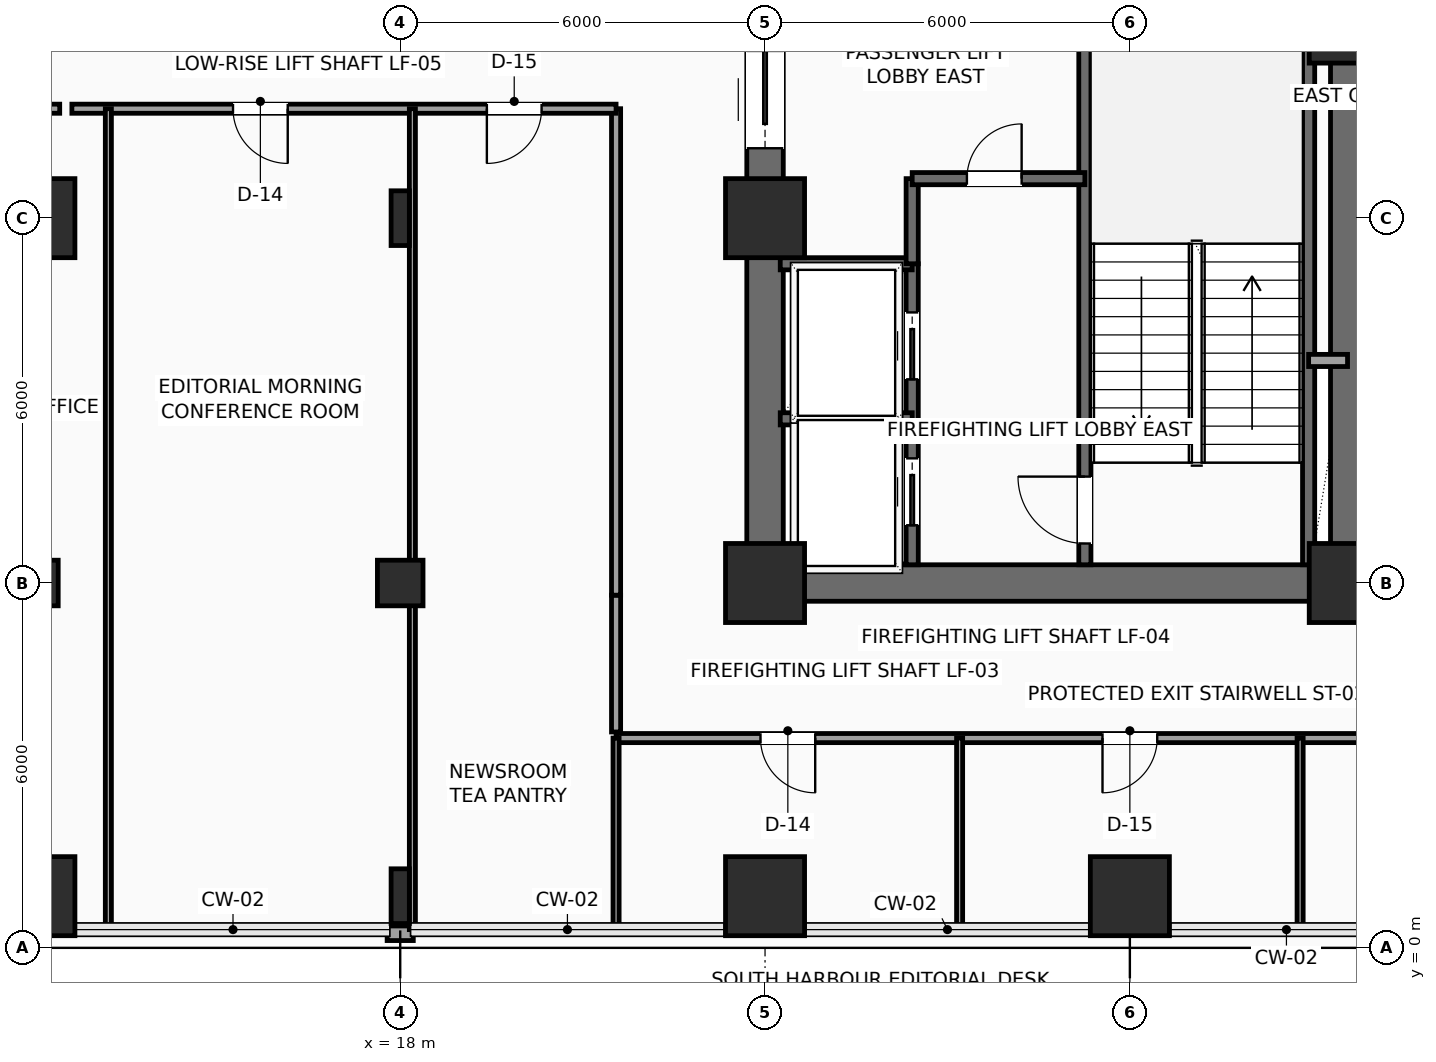
"""IFC4 building model, lengths in metres.
Left out: names, types, materials, properties, quantities, classifications, styles, units other than length and angle.
Written with IfcOpenShell. Run it as: python <this file> out.ifc"""

import sys

from ifc_helpers import new_model, si_unit, direction, frame, frame_2d, origin, origin_2d, place, context, subcontext, project, spatial, rectangle, hollow_rectangle, i_section, extrude, element, fill, save


model = new_model("IFC4")
c1 = context("Model", 3, precision=1e-05, world=origin(), true_north=direction((0.0, 1.0)))
c2 = subcontext(c1, "Body", "Model", "MODEL_VIEW")
j1 = project(units=[si_unit("LENGTHUNIT", "METRE"), si_unit("PLANEANGLEUNIT", "RADIAN")], contexts=[c1])
p1 = place(None, origin())
s1 = spatial("IfcSite", under=j1, at=p1, CompositionType="ELEMENT")
p2 = place(p1, origin())
s2 = spatial("IfcBuilding", under=s1, at=p2, CompositionType="ELEMENT")
p3 = place(p2, frame((0.0, 0.0, 40.2)))
s3 = spatial("IfcBuildingStorey", under=s2, at=p3, CompositionType="ELEMENT", Elevation=40.2)
for number, where, z_axis, x_axis in (
    (1, (24.0, 6.0, 0.0), (0.0, 0.0, 1.0), (1.0, 0.0, 0.0)),
    (2, (24.0, 12.0, 0.0), (0.0, 0.0, 1.0), (1.0, 0.0, 0.0)),
    (3, (33.6, 6.0, 0.0), (0.0, 0.0, 1.0), (1.0, 0.0, 0.0)),
    (4, (33.6, 15.2, 0.0), (0.0, 0.0, 1.0), (1.0, 0.0, 0.0)),
    (5, (12.0, 0.85, 0.0), (0.0, 0.0, 1.0), (1.0, 0.0, 0.0)),
):
    element("IfcColumn", number, at=place(p3, frame(where, z_axis=z_axis, x_axis=x_axis)), inside=s3, PredefinedType="COLUMN", context=c2, shape_type="SweptSolid", body=[
        extrude(rectangle(XDim=1.3, YDim=1.3, at=origin_2d()), origin(), (0.0, 0.0, 1.0), 3.9),
    ])
p4 = place(p3, frame((12.0, 6.0, 0.0), z_axis=(0.0, 0.0, 1.0), x_axis=(1.0, 0.0, 0.0)))
e6 = element("IfcColumn", 6, at=p4, inside=s3, PredefinedType="COLUMN", context=c2, shape_type="SweptSolid", body=[
    extrude(hollow_rectangle(XDim=0.75, YDim=0.75, WallThickness=0.035, InnerFilletRadius=0.035, OuterFilletRadius=0.05, at=origin_2d()), origin(), (0.0, 0.0, 1.0), 3.9),
])
p5 = place(p3, frame((12.0, 12.0, 0.0), z_axis=(0.0, 0.0, 1.0), x_axis=(1.0, 0.0, 0.0)))
e7 = element("IfcColumn", 7, at=p5, inside=s3, PredefinedType="COLUMN", context=c2, shape_type="SweptSolid", body=[
    extrude(rectangle(XDim=1.3, YDim=1.3, at=origin_2d()), origin(), (0.0, 0.0, 1.0), 3.9),
])
p6 = place(p3, frame((18.0, 0.85, 0.0), z_axis=(0.0, 0.0, 1.0), x_axis=(1.0, 0.0, 0.0)))
e8 = element("IfcColumn", 8, at=p6, inside=s3, PredefinedType="COLUMN", context=c2, shape_type="SweptSolid", body=[
    extrude(i_section(OverallWidth=0.3, OverallDepth=0.9, WebThickness=0.019, FlangeThickness=0.035, FilletRadius=0.03, at=origin_2d()), origin(), (0.0, 0.0, 1.0), 3.9),
])
p7 = place(p3, frame((18.0, 6.0, 0.0), z_axis=(0.0, 0.0, 1.0), x_axis=(1.0, 0.0, 0.0)))
e9 = element("IfcColumn", 9, at=p7, inside=s3, PredefinedType="COLUMN", context=c2, shape_type="SweptSolid", body=[
    extrude(hollow_rectangle(XDim=0.75, YDim=0.75, WallThickness=0.035, InnerFilletRadius=0.035, OuterFilletRadius=0.05, at=origin_2d()), origin(), (0.0, 0.0, 1.0), 3.9),
])
p8 = place(p3, frame((18.0, 12.0, 0.0), z_axis=(0.0, 0.0, 1.0), x_axis=(1.0, 0.0, 0.0)))
e10 = element("IfcColumn", 10, at=p8, inside=s3, PredefinedType="COLUMN", context=c2, shape_type="SweptSolid", body=[
    extrude(i_section(OverallWidth=0.3, OverallDepth=0.9, WebThickness=0.019, FlangeThickness=0.035, FilletRadius=0.03, at=origin_2d()), origin(), (0.0, 0.0, 1.0), 3.9),
])
for number, where, z_axis, x_axis in (
    (11, (24.0, 0.85, 0.0), (0.0, 0.0, 1.0), (1.0, 0.0, 0.0)),
    (12, (30.0, 0.85, 0.0), (0.0, 0.0, 1.0), (1.0, 0.0, 0.0)),
):
    element("IfcColumn", number, at=place(p3, frame(where, z_axis=z_axis, x_axis=x_axis)), inside=s3, PredefinedType="COLUMN", context=c2, shape_type="SweptSolid", body=[
        extrude(rectangle(XDim=1.3, YDim=1.3, at=origin_2d()), origin(), (0.0, 0.0, 1.0), 3.9),
    ])
p9 = place(p3, frame((18.215, 0.24, 0.0), z_axis=(0.0, 0.0, 1.0), x_axis=(-1.0, 0.0, 0.0)))
e13 = element("IfcWall", 13, at=p9, inside=s3, PredefinedType="SOLIDWALL", context=c2, shape_type="SweptSolid", body=[
    extrude(rectangle(XDim=0.43, YDim=0.24, at=frame_2d((0.215, 0.0))), origin(), (0.0, 0.0, 1.0), 3.65),
])
p10 = place(p3, frame((24.0, 6.0, 0.0), z_axis=(0.0, 0.0, 1.0), x_axis=(1.0, 0.0, 0.0)))
e14 = element("IfcWall", 14, at=p10, inside=s3, PredefinedType="SHEAR", context=c2, shape_type="SweptSolid", body=[
    extrude(rectangle(XDim=9.6, YDim=0.6, at=frame_2d((4.8, 0.0))), origin(), (0.0, 0.0, 1.0), 3.65),
])
p11 = place(p3, frame((24.0, 6.0, 0.0), z_axis=(0.0, 0.0, 1.0), x_axis=(0.0, 1.0, 0.0)))
e15 = element("IfcWall", 15, at=p11, inside=s3, PredefinedType="SHEAR", context=c2, shape_type="SweptSolid", body=[
    extrude(rectangle(XDim=12.0, YDim=0.6, at=frame_2d((6.0, 0.0))), origin(), (0.0, 0.0, 1.0), 3.65),
])
p12 = place(p11, frame((7.15, 0.0, 0.0)))
e16 = element("IfcOpeningElement", 16, at=p12, cuts=e15, PredefinedType="OPENING", context=c2, shape_type="SweptSolid", body=[
    extrude(rectangle(XDim=1.6, YDim=2.3, at=frame_2d((0.8, 1.15))), frame((0.0, 0.31, 0.0), z_axis=(0.0, -1.0, 0.0), x_axis=(1.0, 0.0, 0.0)), (0.0, 0.0, 1.0), 0.62),
])
p13 = place(p3, frame((33.6, 6.0, 0.0), z_axis=(0.0, 0.0, 1.0), x_axis=(0.0, 1.0, 0.0)))
e17 = element("IfcWall", 17, at=p13, inside=s3, PredefinedType="SHEAR", context=c2, shape_type="SweptSolid", body=[
    extrude(rectangle(XDim=12.0, YDim=0.6, at=frame_2d((6.0, 0.0))), origin(), (0.0, 0.0, 1.0), 3.65),
])
p14 = place(p13, frame((10.2, 0.0, 0.0)))
e18 = element("IfcOpeningElement", 18, at=p14, cuts=e17, PredefinedType="OPENING", context=c2, shape_type="SweptSolid", body=[
    extrude(rectangle(XDim=0.9, YDim=2.15, at=frame_2d((0.45, 1.075))), frame((0.0, 0.31, 0.0), z_axis=(0.0, -1.0, 0.0), x_axis=(1.0, 0.0, 0.0)), (0.0, 0.0, 1.0), 0.62),
])
p15 = place(p3, frame((29.26, 6.3, 0.0), z_axis=(0.0, 0.0, 1.0), x_axis=(0.0, 1.0, 0.0)))
e19 = element("IfcWall", 19, at=p15, inside=s3, PredefinedType="SHEAR", context=c2, shape_type="SweptSolid", body=[
    extrude(rectangle(XDim=8.88, YDim=0.2, at=frame_2d((4.44, 0.0))), origin(), (0.0, 0.0, 1.0), 3.65),
])
p16 = place(p15, frame((0.35, 0.0, 0.0)))
e20 = element("IfcOpeningElement", 20, at=p16, cuts=e19, PredefinedType="OPENING", context=c2, shape_type="SweptSolid", body=[
    extrude(rectangle(XDim=1.1, YDim=2.2, at=frame_2d((0.55, 1.1))), frame((0.0, 0.11, 0.0), z_axis=(0.0, -1.0, 0.0), x_axis=(1.0, 0.0, 0.0)), (0.0, 0.0, 1.0), 0.22),
])
p17 = place(p3, frame((32.94, 6.3, 0.0), z_axis=(0.0, 0.0, 1.0), x_axis=(0.0, 1.0, 0.0)))
e21 = element("IfcWall", 21, at=p17, inside=s3, PredefinedType="SHEAR", context=c2, shape_type="SweptSolid", body=[
    extrude(rectangle(XDim=8.88, YDim=0.2, at=frame_2d((4.44, 0.0))), origin(), (0.0, 0.0, 1.0), 3.65),
])
p18 = place(p3, frame((26.42, 6.3, 0.0), z_axis=(0.0, 0.0, 1.0), x_axis=(0.0, 1.0, 0.0)))
e22 = element("IfcWall", 22, at=p18, inside=s3, PredefinedType="SHEAR", context=c2, shape_type="SweptSolid", body=[
    extrude(rectangle(XDim=4.95, YDim=0.2, at=frame_2d((2.475, 0.0))), origin(), (0.0, 0.0, 1.0), 3.65),
])
p19 = place(p18, frame((0.65, 0.0, 0.0)))
e23 = element("IfcOpeningElement", 23, at=p19, cuts=e22, PredefinedType="OPENING", context=c2, shape_type="SweptSolid", body=[
    extrude(rectangle(XDim=1.1, YDim=2.2, at=frame_2d((0.55, 1.1))), frame((0.0, 0.11, 0.0), z_axis=(0.0, -1.0, 0.0), x_axis=(1.0, 0.0, 0.0)), (0.0, 0.0, 1.0), 0.22),
])
p20 = place(p18, frame((3.05, 0.0, 0.0)))
e24 = element("IfcOpeningElement", 24, at=p20, cuts=e22, PredefinedType="OPENING", context=c2, shape_type="SweptSolid", body=[
    extrude(rectangle(XDim=1.1, YDim=2.2, at=frame_2d((0.55, 1.1))), frame((0.0, 0.11, 0.0), z_axis=(0.0, -1.0, 0.0), x_axis=(1.0, 0.0, 0.0)), (0.0, 0.0, 1.0), 0.22),
])
for number, where, z_axis, x_axis in (
    (25, (24.25, 8.7, 0.0), (0.0, 0.0, 1.0), (1.0, 0.0, 0.0)),
    (26, (24.25, 11.25, 0.0), (0.0, 0.0, 1.0), (1.0, 0.0, 0.0)),
):
    element("IfcWall", number, at=place(p3, frame(where, z_axis=z_axis, x_axis=x_axis)), inside=s3, PredefinedType="SHEAR", context=c2, shape_type="SweptSolid", body=[
        extrude(rectangle(XDim=2.17, YDim=0.2, at=frame_2d((1.085, 0.0))), origin(), (0.0, 0.0, 1.0), 3.65),
    ])
p21 = place(p3, frame((26.42, 11.25, 0.0), z_axis=(0.0, 0.0, 1.0), x_axis=(0.0, 1.0, 0.0)))
e27 = element("IfcWall", 27, at=p21, inside=s3, PredefinedType="SHEAR", context=c2, shape_type="SweptSolid", body=[
    extrude(rectangle(XDim=1.4, YDim=0.2, at=frame_2d((0.7, 0.0))), origin(), (0.0, 0.0, 1.0), 3.65),
])
p22 = place(p3, frame((26.42, 12.65, 0.0), z_axis=(0.0, 0.0, 1.0), x_axis=(1.0, 0.0, 0.0)))
e28 = element("IfcWall", 28, at=p22, inside=s3, PredefinedType="SHEAR", context=c2, shape_type="SweptSolid", body=[
    extrude(rectangle(XDim=2.84, YDim=0.2, at=frame_2d((1.42, 0.0))), origin(), (0.0, 0.0, 1.0), 3.65),
])
p23 = place(p22, frame((0.9, 0.0, 0.0)))
e29 = element("IfcOpeningElement", 29, at=p23, cuts=e28, PredefinedType="OPENING", context=c2, shape_type="SweptSolid", body=[
    extrude(rectangle(XDim=0.9, YDim=2.15, at=frame_2d((0.45, 1.075))), frame((0.0, 0.11, 0.0), z_axis=(0.0, -1.0, 0.0), x_axis=(1.0, 0.0, 0.0)), (0.0, 0.0, 1.0), 0.22),
])
p24 = place(p3, frame((32.94, 9.66, 0.0), z_axis=(0.0, 0.0, 1.0), x_axis=(1.0, 0.0, 0.0)))
e30 = element("IfcWall", 30, at=p24, inside=s3, PredefinedType="SOLIDWALL", context=c2, shape_type="SweptSolid", body=[
    extrude(rectangle(XDim=0.64, YDim=0.2, at=frame_2d((0.32, 0.0))), origin(), (0.0, 0.0, 1.0), 3.65),
])
p25 = place(p3, frame((36.15, 3.45, 0.0), z_axis=(0.0, 0.0, 1.0), x_axis=(-1.0, 0.0, 0.0)))
e31 = element("IfcWall", 31, at=p25, inside=s3, PredefinedType="PARTITIONING", context=c2, shape_type="SweptSolid", body=[
    extrude(rectangle(XDim=14.6, YDim=0.15, at=frame_2d((7.3, 0.0))), origin(), (0.0, 0.0, 1.0), 3.142),
])
p26 = place(p25, frame((11.325, 0.0, 0.0)))
e32 = element("IfcOpeningElement", 32, at=p26, cuts=e31, PredefinedType="OPENING", context=c2, shape_type="SweptSolid", body=[
    extrude(rectangle(XDim=0.9, YDim=2.1, at=frame_2d((0.45, 1.05))), frame((0.0, 0.085, 0.0), z_axis=(0.0, -1.0, 0.0), x_axis=(1.0, 0.0, 0.0)), (0.0, 0.0, 1.0), 0.17),
])
p27 = place(p25, frame((5.7, 0.0, 0.0)))
e33 = element("IfcOpeningElement", 33, at=p27, cuts=e31, PredefinedType="OPENING", context=c2, shape_type="SweptSolid", body=[
    extrude(rectangle(XDim=0.9, YDim=2.1, at=frame_2d((0.45, 1.05))), frame((0.0, 0.085, 0.0), z_axis=(0.0, -1.0, 0.0), x_axis=(1.0, 0.0, 0.0)), (0.0, 0.0, 1.0), 0.17),
])
p28 = place(p3, frame((21.55, 3.55, 0.0), z_axis=(0.0, 0.0, 1.0), x_axis=(0.0, 1.0, 0.0)))
e34 = element("IfcWall", 34, at=p28, inside=s3, PredefinedType="PARTITIONING", context=c2, shape_type="SweptSolid", body=[
    extrude(rectangle(XDim=2.25, YDim=0.15, at=frame_2d((1.125, 0.0))), origin(), (0.0, 0.0, 1.0), 3.65),
])
p29 = place(p3, frame((21.55, 5.8, 0.0), z_axis=(0.0, 0.0, 1.0), x_axis=(0.0, 1.0, 0.0)))
e35 = element("IfcWall", 35, at=p29, inside=s3, PredefinedType="PARTITIONING", context=c2, shape_type="SweptSolid", body=[
    extrude(rectangle(XDim=8.0, YDim=0.15, at=frame_2d((4.0, 0.0))), origin(), (0.0, 0.0, 1.0), 3.65),
])
p30 = place(p3, frame((21.55, 13.8, 0.0), z_axis=(0.0, 0.0, 1.0), x_axis=(-1.0, 0.0, 0.0)))
e36 = element("IfcWall", 36, at=p30, inside=s3, PredefinedType="PARTITIONING", context=c2, shape_type="SweptSolid", body=[
    extrude(rectangle(XDim=8.95, YDim=0.15, at=frame_2d((4.475, 0.0))), origin(), (0.0, 0.0, 1.0), 3.65),
])
p31 = place(p30, frame((5.4, 0.0, 0.0)))
e37 = element("IfcOpeningElement", 37, at=p31, cuts=e36, PredefinedType="OPENING", context=c2, shape_type="SweptSolid", body=[
    extrude(rectangle(XDim=0.9, YDim=2.1, at=frame_2d((0.45, 1.05))), frame((0.0, 0.085, 0.0), z_axis=(0.0, -1.0, 0.0), x_axis=(1.0, 0.0, 0.0)), (0.0, 0.0, 1.0), 0.17),
])
p32 = place(p30, frame((1.225, 0.0, 0.0)))
e38 = element("IfcOpeningElement", 38, at=p32, cuts=e36, PredefinedType="OPENING", context=c2, shape_type="SweptSolid", body=[
    extrude(rectangle(XDim=0.9, YDim=2.1, at=frame_2d((0.45, 1.05))), frame((0.0, 0.085, 0.0), z_axis=(0.0, -1.0, 0.0), x_axis=(1.0, 0.0, 0.0)), (0.0, 0.0, 1.0), 0.17),
])
p33 = place(p3, frame((12.4, 13.8, 0.0), z_axis=(0.0, 0.0, 1.0), x_axis=(-1.0, 0.0, 0.0)))
e39 = element("IfcWall", 39, at=p33, inside=s3, PredefinedType="PARTITIONING", context=c2, shape_type="SweptSolid", body=[
    extrude(rectangle(XDim=7.15, YDim=0.15, at=frame_2d((3.575, 0.0))), origin(), (0.0, 0.0, 1.0), 3.65),
])
p34 = place(p33, frame((3.125, 0.0, 0.0)))
e40 = element("IfcOpeningElement", 40, at=p34, cuts=e39, PredefinedType="OPENING", context=c2, shape_type="SweptSolid", body=[
    extrude(rectangle(XDim=0.9, YDim=2.1, at=frame_2d((0.45, 1.05))), frame((0.0, 0.085, 0.0), z_axis=(0.0, -1.0, 0.0), x_axis=(1.0, 0.0, 0.0)), (0.0, 0.0, 1.0), 0.17),
])
p35 = place(p3, frame((6.215, 0.327, 0.0), z_axis=(0.0, 0.0, 1.0), x_axis=(0.999992473807, -0.003879733121, 0.0)))
e41 = element("IfcWall", 41, at=p35, inside=s3, PredefinedType="PARTITIONING", context=c2, shape_type="SweptSolid", body=[
    extrude(rectangle(XDim=6.985, YDim=0.1, at=frame_2d((3.492, 0.0))), origin(), (0.0, 0.0, 1.0), 3.65),
])
p36 = place(p3, frame((13.2, 0.3, 0.0), z_axis=(0.0, 0.0, 1.0), x_axis=(0.0, 1.0, 0.0)))
e42 = element("IfcWall", 42, at=p36, inside=s3, PredefinedType="PARTITIONING", context=c2, shape_type="SweptSolid", body=[
    extrude(rectangle(XDim=13.5, YDim=0.1, at=frame_2d((6.75, 0.0))), origin(), (0.0, 0.0, 1.0), 3.65),
])
p37 = place(p3, frame((18.2, 0.3, 0.0), z_axis=(0.0, 0.0, 1.0), x_axis=(0.0, 1.0, 0.0)))
e43 = element("IfcWall", 43, at=p37, inside=s3, PredefinedType="PARTITIONING", context=c2, shape_type="SweptSolid", body=[
    extrude(rectangle(XDim=13.5, YDim=0.1, at=frame_2d((6.75, 0.0))), origin(), (0.0, 0.0, 1.0), 2.992),
])
for number, where, z_axis, x_axis in (
    (44, (21.55, 0.3, 0.0), (0.0, 0.0, 1.0), (0.0, 1.0, 0.0)),
    (45, (27.2, 0.3, 0.0), (0.0, 0.0, 1.0), (0.0, 1.0, 0.0)),
    (46, (32.8, 0.3, 0.0), (0.0, 0.0, 1.0), (0.0, 1.0, 0.0)),
):
    element("IfcWall", number, at=place(p3, frame(where, z_axis=z_axis, x_axis=x_axis)), inside=s3, PredefinedType="PARTITIONING", context=c2, shape_type="SweptSolid", body=[
        extrude(rectangle(XDim=3.15, YDim=0.1, at=frame_2d((1.575, 0.0))), origin(), (0.0, 0.0, 1.0), 3.65),
    ])
p38 = place(p3, frame((33.65, 5.8, 0.0), z_axis=(0.0, 0.0, 1.0), x_axis=(1.0, 0.0, 0.0)))
e47 = element("IfcWall", 47, at=p38, inside=s3, PredefinedType="PARTITIONING", context=c2, shape_type="SweptSolid", body=[
    extrude(rectangle(XDim=2.5, YDim=0.1, at=frame_2d((1.25, 0.0))), origin(), (0.0, 0.0, 1.0), 2.992),
])
p39 = place(p12, origin())
e48 = element("IfcDoor", 48, at=p39, inside=s3, OperationType="DOUBLE_DOOR_SLIDING", PredefinedType="DOOR", context=c2, shape_type="SweptSolid", body=[
    extrude(rectangle(XDim=1.6, YDim=2.3, at=frame_2d((0.8, 1.15))), frame((0.0, 0.025, 0.0), z_axis=(0.0, -1.0, 0.0), x_axis=(1.0, 0.0, 0.0)), (0.0, 0.0, 1.0), 0.05),
])
fill(e16, e48)
p40 = place(p16, origin())
e49 = element("IfcDoor", 49, at=p40, inside=s3, OperationType="SINGLE_SWING_RIGHT", PredefinedType="DOOR", context=c2, shape_type="SweptSolid", body=[
    extrude(rectangle(XDim=1.1, YDim=2.2, at=frame_2d((0.55, 1.1))), frame((0.0, 0.025, 0.0), z_axis=(0.0, -1.0, 0.0), x_axis=(1.0, 0.0, 0.0)), (0.0, 0.0, 1.0), 0.05),
])
fill(e20, e49)
p41 = place(p19, origin())
e50 = element("IfcDoor", 50, at=p41, inside=s3, OperationType="SLIDING_TO_LEFT", PredefinedType="DOOR", context=c2, shape_type="SweptSolid", body=[
    extrude(rectangle(XDim=1.1, YDim=2.2, at=frame_2d((0.55, 1.1))), frame((0.0, 0.025, 0.0), z_axis=(0.0, -1.0, 0.0), x_axis=(1.0, 0.0, 0.0)), (0.0, 0.0, 1.0), 0.05),
])
fill(e23, e50)
p42 = place(p20, origin())
e51 = element("IfcDoor", 51, at=p42, inside=s3, OperationType="SLIDING_TO_LEFT", PredefinedType="DOOR", context=c2, shape_type="SweptSolid", body=[
    extrude(rectangle(XDim=1.1, YDim=2.2, at=frame_2d((0.55, 1.1))), frame((0.0, 0.025, 0.0), z_axis=(0.0, -1.0, 0.0), x_axis=(1.0, 0.0, 0.0)), (0.0, 0.0, 1.0), 0.05),
])
fill(e24, e51)
p43 = place(p23, origin())
e52 = element("IfcDoor", 52, at=p43, inside=s3, OperationType="SINGLE_SWING_RIGHT", PredefinedType="DOOR", context=c2, shape_type="SweptSolid", body=[
    extrude(rectangle(XDim=0.9, YDim=2.15, at=frame_2d((0.45, 1.075))), frame((0.0, 0.025, 0.0), z_axis=(0.0, -1.0, 0.0), x_axis=(1.0, 0.0, 0.0)), (0.0, 0.0, 1.0), 0.05),
])
fill(e29, e52)
p44 = place(p26, origin())
e53 = element("IfcDoor", 53, at=p44, inside=s3, OperationType="SINGLE_SWING_LEFT", PredefinedType="DOOR", context=c2, shape_type="SweptSolid", body=[
    extrude(rectangle(XDim=0.9, YDim=2.1, at=frame_2d((0.45, 1.05))), frame((0.0, 0.025, 0.0), z_axis=(0.0, -1.0, 0.0), x_axis=(1.0, 0.0, 0.0)), (0.0, 0.0, 1.0), 0.05),
])
fill(e32, e53)
p45 = place(p27, origin())
e54 = element("IfcDoor", 54, at=p45, inside=s3, OperationType="SINGLE_SWING_RIGHT", PredefinedType="DOOR", context=c2, shape_type="SweptSolid", body=[
    extrude(rectangle(XDim=0.9, YDim=2.1, at=frame_2d((0.45, 1.05))), frame((0.0, 0.025, 0.0), z_axis=(0.0, -1.0, 0.0), x_axis=(1.0, 0.0, 0.0)), (0.0, 0.0, 1.0), 0.05),
])
fill(e33, e54)
p46 = place(p31, origin())
e55 = element("IfcDoor", 55, at=p46, inside=s3, OperationType="SINGLE_SWING_LEFT", PredefinedType="DOOR", context=c2, shape_type="SweptSolid", body=[
    extrude(rectangle(XDim=0.9, YDim=2.1, at=frame_2d((0.45, 1.05))), frame((0.0, 0.025, 0.0), z_axis=(0.0, -1.0, 0.0), x_axis=(1.0, 0.0, 0.0)), (0.0, 0.0, 1.0), 0.05),
])
fill(e37, e55)
p47 = place(p32, origin())
e56 = element("IfcDoor", 56, at=p47, inside=s3, OperationType="SINGLE_SWING_RIGHT", PredefinedType="DOOR", context=c2, shape_type="SweptSolid", body=[
    extrude(rectangle(XDim=0.9, YDim=2.1, at=frame_2d((0.45, 1.05))), frame((0.0, 0.025, 0.0), z_axis=(0.0, -1.0, 0.0), x_axis=(1.0, 0.0, 0.0)), (0.0, 0.0, 1.0), 0.05),
])
fill(e38, e56)
save(model, sys.argv[1])
